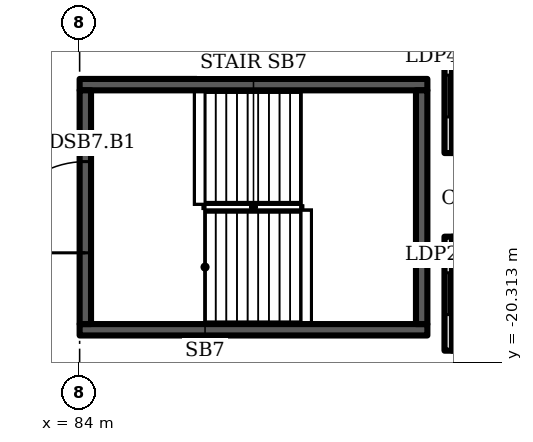
"""IFC4 building model, lengths in metres.
Left out: names, types, materials, properties, quantities, classifications, styles, units other than length and angle.
Written with IfcOpenShell. Run it as: python <this file> out.ifc"""

import sys

from ifc_helpers import new_model, si_unit, direction, frame, frame_2d, origin, place, context, subcontext, project, spatial, rectangle, extrude, element, fill, save


model = new_model("IFC4")
c1 = context("Model", 3, precision=1e-05, world=origin(), true_north=direction((0.0, 1.0)))
c2 = subcontext(c1, "Body", "Model", "MODEL_VIEW")
j1 = project(units=[si_unit("LENGTHUNIT", "METRE"), si_unit("PLANEANGLEUNIT", "RADIAN")], contexts=[c1])
p1 = place(None, origin())
s1 = spatial("IfcSite", under=j1, at=p1, CompositionType="ELEMENT")
p2 = place(p1, origin())
s2 = spatial("IfcBuilding", under=s1, at=p2, CompositionType="ELEMENT")
p3 = place(p2, frame((0.0, 0.0, -7.2)))
s3 = spatial("IfcBuildingStorey", under=s2, at=p3, CompositionType="ELEMENT", Elevation=-7.2)
for number, where, z_axis, x_axis in (
    (1, (84.0, -19.45, 0.0), (0.0, 0.0, 1.0), (1.0, 0.0, 0.0)),
    (2, (84.0, -13.0, 0.0), (0.0, 0.0, 1.0), (1.0, 0.0, 0.0)),
):
    element("IfcWall", number, at=place(p3, frame(where, z_axis=z_axis, x_axis=x_axis)), inside=s3, PredefinedType="SHEAR", context=c2, shape_type="SweptSolid", body=[
        extrude(rectangle(XDim=9.15, YDim=0.3, at=frame_2d((4.575, 0.0))), origin(), (0.0, 0.0, 1.0), 6.9),
    ])
p4 = place(p3, frame((84.15, -19.3, 0.0), z_axis=(0.0, 0.0, 1.0), x_axis=(0.0, 1.0, 0.0)))
e3 = element("IfcWall", 3, at=p4, inside=s3, PredefinedType="SHEAR", context=c2, shape_type="SweptSolid", body=[
    extrude(rectangle(XDim=6.15, YDim=0.3, at=frame_2d((3.075, 0.0))), origin(), (0.0, 0.0, 1.0), 6.9),
])
p5 = place(p4, frame((1.875, 0.0, 0.0)))
e4 = element("IfcOpeningElement", 4, at=p5, cuts=e3, PredefinedType="OPENING", context=c2, shape_type="SweptSolid", body=[
    extrude(rectangle(XDim=2.4, YDim=2.1, at=frame_2d((1.2, 1.05))), frame((0.0, 0.16, 0.0), z_axis=(0.0, -1.0, 0.0), x_axis=(1.0, 0.0, 0.0)), (0.0, 0.0, 1.0), 0.32),
])
p6 = place(p3, frame((93.0, -19.3, 0.0), z_axis=(0.0, 0.0, 1.0), x_axis=(0.0, 1.0, 0.0)))
e5 = element("IfcWall", 5, at=p6, inside=s3, PredefinedType="SHEAR", context=c2, shape_type="SweptSolid", body=[
    extrude(rectangle(XDim=6.15, YDim=0.3, at=frame_2d((3.075, 0.0))), origin(), (0.0, 0.0, 1.0), 6.9),
])
p7 = place(p3, frame((93.7, -20.0, 0.0), z_axis=(0.0, 0.0, 1.0), x_axis=(0.0, 1.0, 0.0)))
e6 = element("IfcWall", 6, at=p7, inside=s3, PredefinedType="PARTITIONING", context=c2, shape_type="SweptSolid", body=[
    extrude(rectangle(XDim=3.0, YDim=0.2, at=frame_2d((1.5, 0.0))), origin(), (0.0, 0.0, 1.0), 6.9),
])
p8 = place(p7, frame((0.95, 0.0, 0.0)))
e7 = element("IfcOpeningElement", 7, at=p8, cuts=e6, PredefinedType="OPENING", context=c2, shape_type="SweptSolid", body=[
    extrude(rectangle(XDim=1.1, YDim=2.1, at=frame_2d((0.55, 1.05))), frame((0.0, 0.11, 0.0), z_axis=(0.0, -1.0, 0.0), x_axis=(1.0, 0.0, 0.0)), (0.0, 0.0, 1.0), 0.22),
])
for number, where, z_axis, x_axis in (
    (8, (93.8, -19.9, 0.0), (0.0, 0.0, 1.0), (1.0, 0.0, 0.0)),
    (9, (93.8, -17.1, 0.0), (0.0, 0.0, 1.0), (1.0, 0.0, 0.0)),
):
    element("IfcWall", number, at=place(p3, frame(where, z_axis=z_axis, x_axis=x_axis)), inside=s3, PredefinedType="PARTITIONING", context=c2, shape_type="SweptSolid", body=[
        extrude(rectangle(XDim=2.2, YDim=0.2, at=frame_2d((1.1, 0.0))), origin(), (0.0, 0.0, 1.0), 6.9),
    ])
p9 = place(p3, frame((93.7, -14.8, 0.0), z_axis=(0.0, 0.0, 1.0), x_axis=(0.0, 1.0, 0.0)))
e10 = element("IfcWall", 10, at=p9, inside=s3, PredefinedType="PARTITIONING", context=c2, shape_type="SweptSolid", body=[
    extrude(rectangle(XDim=3.0, YDim=0.2, at=frame_2d((1.5, 0.0))), origin(), (0.0, 0.0, 1.0), 6.9),
])
p10 = place(p9, frame((0.95, 0.0, 0.0)))
e11 = element("IfcOpeningElement", 11, at=p10, cuts=e10, PredefinedType="OPENING", context=c2, shape_type="SweptSolid", body=[
    extrude(rectangle(XDim=1.1, YDim=2.1, at=frame_2d((0.55, 1.05))), frame((0.0, 0.11, 0.0), z_axis=(0.0, -1.0, 0.0), x_axis=(1.0, 0.0, 0.0)), (0.0, 0.0, 1.0), 0.22),
])
p11 = place(p3, frame((93.8, -14.7, 0.0), z_axis=(0.0, 0.0, 1.0), x_axis=(1.0, 0.0, 0.0)))
e12 = element("IfcWall", 12, at=p11, inside=s3, PredefinedType="PARTITIONING", context=c2, shape_type="SweptSolid", body=[
    extrude(rectangle(XDim=2.2, YDim=0.2, at=frame_2d((1.1, 0.0))), origin(), (0.0, 0.0, 1.0), 6.9),
])
p12 = place(p5, origin())
e13 = element("IfcDoor", 13, at=p12, inside=s3, OperationType="DOUBLE_DOOR_SINGLE_SWING", PredefinedType="DOOR", context=c2, shape_type="SweptSolid", body=[
    extrude(rectangle(XDim=2.4, YDim=2.1, at=frame_2d((1.2, 1.05))), frame((0.0, 0.025, 0.0), z_axis=(0.0, -1.0, 0.0), x_axis=(1.0, 0.0, 0.0)), (0.0, 0.0, 1.0), 0.05),
])
fill(e4, e13)
p13 = place(p8, origin())
e14 = element("IfcDoor", 14, at=p13, inside=s3, OperationType="DOUBLE_DOOR_SLIDING", PredefinedType="DOOR", context=c2, shape_type="SweptSolid", body=[
    extrude(rectangle(XDim=1.1, YDim=2.1, at=frame_2d((0.55, 1.05))), frame((0.0, 0.025, 0.0), z_axis=(0.0, -1.0, 0.0), x_axis=(1.0, 0.0, 0.0)), (0.0, 0.0, 1.0), 0.05),
])
fill(e7, e14)
p14 = place(p10, origin())
e15 = element("IfcDoor", 15, at=p14, inside=s3, OperationType="DOUBLE_DOOR_SLIDING", PredefinedType="DOOR", context=c2, shape_type="SweptSolid", body=[
    extrude(rectangle(XDim=1.1, YDim=2.1, at=frame_2d((0.55, 1.05))), frame((0.0, 0.025, 0.0), z_axis=(0.0, -1.0, 0.0), x_axis=(1.0, 0.0, 0.0)), (0.0, 0.0, 1.0), 0.05),
])
fill(e11, e15)
save(model, sys.argv[1])
